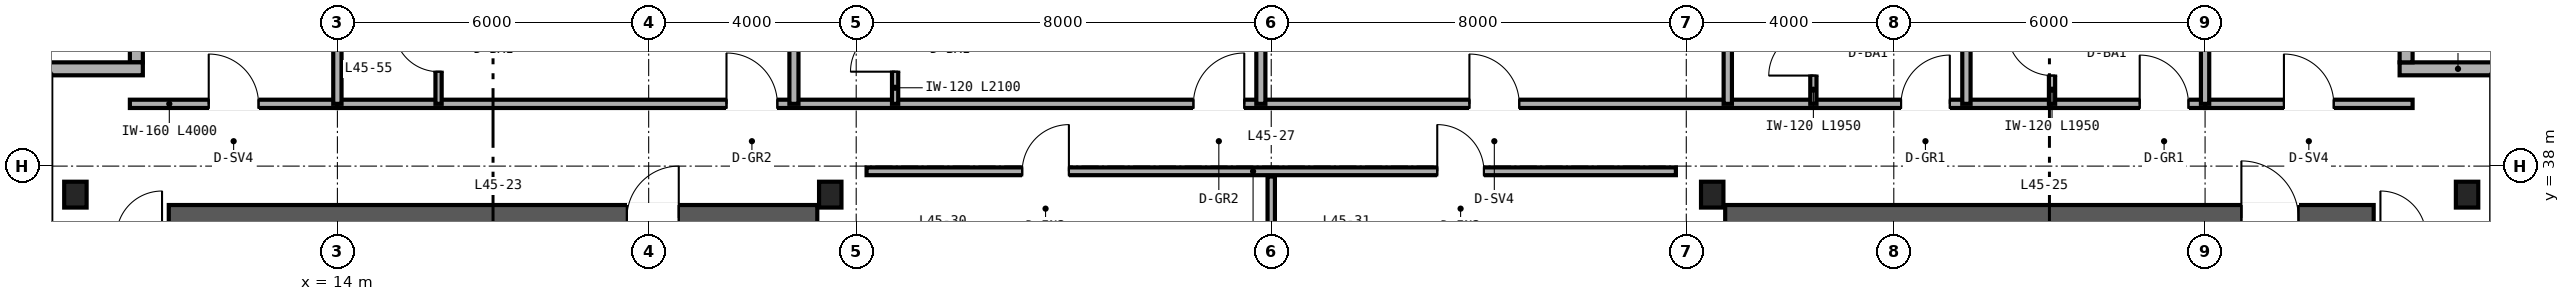
"""IFC4 building model, lengths in metres.
Left out: names, types, materials, properties, quantities, classifications, styles, units other than length and angle.
Written with IfcOpenShell. Run it as: python <this file> out.ifc"""

import sys

from ifc_helpers import new_model, si_unit, direction, frame, frame_2d, origin, origin_2d, place, context, subcontext, project, spatial, rectangle, i_section, extrude, source, transform, mapped, element, fill, save


model = new_model("IFC4")
c1 = context("Model", 3, precision=1e-05, world=origin(), true_north=direction((0.0, 1.0)))
c2 = subcontext(c1, "Body", "Model", "MODEL_VIEW")
j1 = project(units=[si_unit("LENGTHUNIT", "METRE"), si_unit("PLANEANGLEUNIT", "RADIAN")], contexts=[c1])
p1 = place(None, origin())
s1 = spatial("IfcSite", under=j1, at=p1, CompositionType="ELEMENT")
p2 = place(p1, origin())
s2 = spatial("IfcBuilding", under=s1, at=p2, CompositionType="ELEMENT")
p3 = place(p2, frame((0.0, 0.0, 181.2)))
s3 = spatial("IfcBuildingStorey", under=s2, at=p3, CompositionType="ELEMENT", Elevation=181.2)
p4 = place(p3, frame((10.75, 37.0, 0.0), z_axis=(0.0, 0.0, 1.0), x_axis=(1.0, 0.0, 0.0)))
e1 = element("IfcWall", 1, at=p4, inside=s3, PredefinedType="SHEAR", context=c2, shape_type="SweptSolid", body=[
    extrude(rectangle(XDim=12.5, YDim=0.5, at=frame_2d((6.25, 0.0))), origin(), (0.0, 0.0, 1.0), 3.37),
])
p5 = place(p4, frame((8.83, 0.0, 0.0)))
e2 = element("IfcOpeningElement", 2, at=p5, cuts=e1, PredefinedType="OPENING", context=c2, shape_type="SweptSolid", body=[
    extrude(rectangle(XDim=1.0, YDim=2.15, at=frame_2d((0.5, 1.075))), frame((0.0, 0.26, 0.0), z_axis=(0.0, -1.0, 0.0), x_axis=(1.0, 0.0, 0.0)), (0.0, 0.0, 1.0), 0.52),
])
p6 = place(p3, frame((40.75, 37.0, 0.0), z_axis=(0.0, 0.0, 1.0), x_axis=(1.0, 0.0, 0.0)))
e3 = element("IfcWall", 3, at=p6, inside=s3, PredefinedType="SHEAR", context=c2, shape_type="SweptSolid", body=[
    extrude(rectangle(XDim=12.5, YDim=0.5, at=frame_2d((6.25, 0.0))), origin(), (0.0, 0.0, 1.0), 3.37),
])
p7 = place(p6, frame((9.95, 0.0, 0.0)))
e4 = element("IfcOpeningElement", 4, at=p7, cuts=e3, PredefinedType="OPENING", context=c2, shape_type="SweptSolid", body=[
    extrude(rectangle(XDim=1.1, YDim=2.15, at=frame_2d((0.55, 1.075))), frame((0.0, 0.26, 0.0), z_axis=(0.0, -1.0, 0.0), x_axis=(1.0, 0.0, 0.0)), (0.0, 0.0, 1.0), 0.52),
])
m1 = source(origin(), c2, "Body", "SweptSolid", [
    extrude(i_section(OverallWidth=0.432, OverallDepth=0.498, WebThickness=0.056, FlangeThickness=0.089, FilletRadius=0.025, at=origin_2d()), origin(), (0.0, 0.0, 1.0), 3.37),
])
for number, where, z_axis, x_axis in (
    (5, (8.95, 37.45, 0.0), (0.0, 0.0, 1.0), (1.0, 0.0, 0.0)),
    (6, (23.5, 37.45, 0.0), (0.0, 0.0, 1.0), (1.0, 0.0, 0.0)),
    (7, (40.5, 37.45, 0.0), (0.0, 0.0, 1.0), (1.0, 0.0, 0.0)),
    (8, (55.05, 37.45, 0.0), (0.0, 0.0, 1.0), (1.0, 0.0, 0.0)),
):
    element("IfcColumn", number, at=place(p3, frame(where, z_axis=z_axis, x_axis=x_axis)), inside=s3, PredefinedType="COLUMN", context=c2, shape_type="MappedRepresentation", body=[
        mapped(m1, transform((0.0, 0.0, 0.0), scale=1.0)),
    ])
p8 = place(p3, frame((56.0, 39.875, 0.0), z_axis=(0.0, 0.0, 1.0), x_axis=(-1.0, 0.0, 0.0)))
e9 = element("IfcWall", 9, at=p8, inside=s3, PredefinedType="SOLIDWALL", context=c2, shape_type="SweptSolid", body=[
    extrude(rectangle(XDim=2.25, YDim=0.25, at=frame_2d((1.125, 0.0))), origin(), (0.0, 0.0, 1.0), 3.37),
])
for number, where, z_axis, x_axis in (
    (10, (53.875, 40.0, 0.0), (0.0, 0.0, 1.0), (0.0, 1.0, 0.0)),
    (11, (10.125, 42.0, 0.0), (0.0, 0.0, 1.0), (0.0, -1.0, 0.0)),
):
    element("IfcWall", number, at=place(p3, frame(where, z_axis=z_axis, x_axis=x_axis)), inside=s3, PredefinedType="SOLIDWALL", context=c2, shape_type="SweptSolid", body=[
        extrude(rectangle(XDim=2.0, YDim=0.25, at=frame_2d((1.0, 0.0))), origin(), (0.0, 0.0, 1.0), 3.37),
    ])
p9 = place(p3, frame((10.25, 39.875, 0.0), z_axis=(0.0, 0.0, 1.0), x_axis=(-1.0, 0.0, 0.0)))
e12 = element("IfcWall", 12, at=p9, inside=s3, PredefinedType="SOLIDWALL", context=c2, shape_type="SweptSolid", body=[
    extrude(rectangle(XDim=2.25, YDim=0.25, at=frame_2d((1.125, 0.0))), origin(), (0.0, 0.0, 1.0), 3.37),
])
p10 = place(p3, frame((24.2, 37.9, 0.0), z_axis=(0.0, 0.0, 1.0), x_axis=(1.0, 0.0, 0.0)))
e13 = element("IfcWall", 13, at=p10, inside=s3, PredefinedType="PARTITIONING", context=c2, shape_type="SweptSolid", body=[
    extrude(rectangle(XDim=15.6, YDim=0.15, at=frame_2d((7.8, 0.0))), origin(), (0.0, 0.0, 1.0), 3.37),
])
p11 = place(p10, frame((3.0, 0.0, 0.0)))
e14 = element("IfcOpeningElement", 14, at=p11, cuts=e13, PredefinedType="OPENING", context=c2, shape_type="SweptSolid", body=[
    extrude(rectangle(XDim=0.9, YDim=2.15, at=frame_2d((0.45, 1.075))), frame((0.0, 0.085, 0.0), z_axis=(0.0, -1.0, 0.0), x_axis=(1.0, 0.0, 0.0)), (0.0, 0.0, 1.0), 0.17),
])
p12 = place(p10, frame((11.0, 0.0, 0.0)))
e15 = element("IfcOpeningElement", 15, at=p12, cuts=e13, PredefinedType="OPENING", context=c2, shape_type="SweptSolid", body=[
    extrude(rectangle(XDim=0.9, YDim=2.15, at=frame_2d((0.45, 1.075))), frame((0.0, 0.085, 0.0), z_axis=(0.0, -1.0, 0.0), x_axis=(1.0, 0.0, 0.0)), (0.0, 0.0, 1.0), 0.17),
])
p13 = place(p3, frame((32.0, 36.12, 0.0), z_axis=(0.0, 0.0, 1.0), x_axis=(0.0, 1.0, 0.0)))
e16 = element("IfcWall", 16, at=p13, inside=s3, PredefinedType="PARTITIONING", context=c2, shape_type="SweptSolid", body=[
    extrude(rectangle(XDim=1.68, YDim=0.142, at=frame_2d((0.84, 0.0))), origin(), (0.0, 0.0, 1.0), 3.37),
])
p14 = place(p3, frame((10.0, 39.2, 0.0), z_axis=(0.0, 0.0, 1.0), x_axis=(1.0, 0.0, 0.0)))
e17 = element("IfcWall", 17, at=p14, inside=s3, PredefinedType="PARTITIONING", context=c2, shape_type="SweptSolid", body=[
    extrude(rectangle(XDim=4.0, YDim=0.16, at=frame_2d((2.0, 0.0))), origin(), (0.0, 0.0, 1.0), 3.37),
])
p15 = place(p14, frame((1.52, 0.0, 0.0)))
e18 = element("IfcOpeningElement", 18, at=p15, cuts=e17, PredefinedType="OPENING", context=c2, shape_type="SweptSolid", body=[
    extrude(rectangle(XDim=0.96, YDim=2.15, at=frame_2d((0.48, 1.075))), frame((0.0, 0.09, 0.0), z_axis=(0.0, -1.0, 0.0), x_axis=(1.0, 0.0, 0.0)), (0.0, 0.0, 1.0), 0.18),
])
p16 = place(p3, frame((50.0, 39.2, 0.0), z_axis=(0.0, 0.0, 1.0), x_axis=(1.0, 0.0, 0.0)))
e19 = element("IfcWall", 19, at=p16, inside=s3, PredefinedType="PARTITIONING", context=c2, shape_type="SweptSolid", body=[
    extrude(rectangle(XDim=4.0, YDim=0.16, at=frame_2d((2.0, 0.0))), origin(), (0.0, 0.0, 1.0), 3.37),
])
p17 = place(p16, frame((1.52, 0.0, 0.0)))
e20 = element("IfcOpeningElement", 20, at=p17, cuts=e19, PredefinedType="OPENING", context=c2, shape_type="SweptSolid", body=[
    extrude(rectangle(XDim=0.96, YDim=2.15, at=frame_2d((0.48, 1.075))), frame((0.0, 0.09, 0.0), z_axis=(0.0, -1.0, 0.0), x_axis=(1.0, 0.0, 0.0)), (0.0, 0.0, 1.0), 0.18),
])
p18 = place(p3, frame((14.0, 39.2, 0.0), z_axis=(0.0, 0.0, 1.0), x_axis=(1.0, 0.0, 0.0)))
e21 = element("IfcWall", 21, at=p18, inside=s3, PredefinedType="PARTITIONING", context=c2, shape_type="SweptSolid", body=[
    extrude(rectangle(XDim=36.0, YDim=0.16, at=frame_2d((18.0, 0.0))), origin(), (0.0, 0.0, 1.0), 2.913),
])
p19 = place(p18, frame((7.5, 0.0, 0.0)))
e22 = element("IfcOpeningElement", 22, at=p19, cuts=e21, PredefinedType="OPENING", context=c2, shape_type="SweptSolid", body=[
    extrude(rectangle(XDim=0.98, YDim=2.2, at=frame_2d((0.49, 1.1))), frame((0.0, 0.09, 0.0), z_axis=(0.0, -1.0, 0.0), x_axis=(1.0, 0.0, 0.0)), (0.0, 0.0, 1.0), 0.18),
])
p20 = place(p18, frame((16.5, 0.0, 0.0)))
e23 = element("IfcOpeningElement", 23, at=p20, cuts=e21, PredefinedType="OPENING", context=c2, shape_type="SweptSolid", body=[
    extrude(rectangle(XDim=0.98, YDim=2.2, at=frame_2d((0.49, 1.1))), frame((0.0, 0.09, 0.0), z_axis=(0.0, -1.0, 0.0), x_axis=(1.0, 0.0, 0.0)), (0.0, 0.0, 1.0), 0.18),
])
p21 = place(p18, frame((21.82, 0.0, 0.0)))
e24 = element("IfcOpeningElement", 24, at=p21, cuts=e21, PredefinedType="OPENING", context=c2, shape_type="SweptSolid", body=[
    extrude(rectangle(XDim=0.96, YDim=2.15, at=frame_2d((0.48, 1.075))), frame((0.0, 0.09, 0.0), z_axis=(0.0, -1.0, 0.0), x_axis=(1.0, 0.0, 0.0)), (0.0, 0.0, 1.0), 0.18),
])
p22 = place(p18, frame((30.14, 0.0, 0.0)))
e25 = element("IfcOpeningElement", 25, at=p22, cuts=e21, PredefinedType="OPENING", context=c2, shape_type="SweptSolid", body=[
    extrude(rectangle(XDim=0.94, YDim=2.15, at=frame_2d((0.47, 1.075))), frame((0.0, 0.09, 0.0), z_axis=(0.0, -1.0, 0.0), x_axis=(1.0, 0.0, 0.0)), (0.0, 0.0, 1.0), 0.18),
])
p23 = place(p18, frame((34.74, 0.0, 0.0)))
e26 = element("IfcOpeningElement", 26, at=p23, cuts=e21, PredefinedType="OPENING", context=c2, shape_type="SweptSolid", body=[
    extrude(rectangle(XDim=0.94, YDim=2.15, at=frame_2d((0.47, 1.075))), frame((0.0, 0.09, 0.0), z_axis=(0.0, -1.0, 0.0), x_axis=(1.0, 0.0, 0.0)), (0.0, 0.0, 1.0), 0.18),
])
for number, where, z_axis, x_axis in (
    (27, (14.0, 39.2, 0.0), (0.0, 0.0, 1.0), (0.0, 1.0, 0.0)),
    (28, (50.0, 39.2, 0.0), (0.0, 0.0, 1.0), (0.0, 1.0, 0.0)),
):
    element("IfcWall", number, at=place(p3, frame(where, z_axis=z_axis, x_axis=x_axis)), inside=s3, PredefinedType="PARTITIONING", context=c2, shape_type="SweptSolid", body=[
        extrude(rectangle(XDim=6.44, YDim=0.16, at=frame_2d((3.22, 0.0))), origin(), (0.0, 0.0, 1.0), 2.677),
    ])
p24 = place(p3, frame((22.8, 39.2, 0.0), z_axis=(0.0, 0.0, 1.0), x_axis=(0.0, 1.0, 0.0)))
e29 = element("IfcWall", 29, at=p24, inside=s3, PredefinedType="PARTITIONING", context=c2, shape_type="SweptSolid", body=[
    extrude(rectangle(XDim=6.44, YDim=0.175, at=frame_2d((3.22, 0.0))), origin(), (0.0, 0.0, 1.0), 2.833),
])
p25 = place(p3, frame((15.95, 39.2, 0.0), z_axis=(0.0, 0.0, 1.0), x_axis=(0.0, 1.0, 0.0)))
e30 = element("IfcWall", 30, at=p25, inside=s3, PredefinedType="PARTITIONING", context=c2, shape_type="SweptSolid", body=[
    extrude(rectangle(XDim=2.1, YDim=0.12, at=frame_2d((1.05, 0.0))), origin(), (0.0, 0.0, 1.0), 3.37),
])
p26 = place(p25, frame((0.62, 0.0, 0.0)))
e31 = element("IfcOpeningElement", 31, at=p26, cuts=e30, PredefinedType="OPENING", context=c2, shape_type="SweptSolid", body=[
    extrude(rectangle(XDim=0.86, YDim=2.1, at=frame_2d((0.43, 1.05))), frame((0.0, 0.07, 0.0), z_axis=(0.0, -1.0, 0.0), x_axis=(1.0, 0.0, 0.0)), (0.0, 0.0, 1.0), 0.14),
])
p27 = place(p3, frame((31.8, 39.2, 0.0), z_axis=(0.0, 0.0, 1.0), x_axis=(0.0, 1.0, 0.0)))
e32 = element("IfcWall", 32, at=p27, inside=s3, PredefinedType="PARTITIONING", context=c2, shape_type="SweptSolid", body=[
    extrude(rectangle(XDim=6.44, YDim=0.175, at=frame_2d((3.22, 0.0))), origin(), (0.0, 0.0, 1.0), 2.443),
])
p28 = place(p3, frame((24.75, 39.2, 0.0), z_axis=(0.0, 0.0, 1.0), x_axis=(0.0, 1.0, 0.0)))
e33 = element("IfcWall", 33, at=p28, inside=s3, PredefinedType="PARTITIONING", context=c2, shape_type="SweptSolid", body=[
    extrude(rectangle(XDim=2.1, YDim=0.12, at=frame_2d((1.05, 0.0))), origin(), (0.0, 0.0, 1.0), 3.37),
])
p29 = place(p28, frame((0.62, 0.0, 0.0)))
e34 = element("IfcOpeningElement", 34, at=p29, cuts=e33, PredefinedType="OPENING", context=c2, shape_type="SweptSolid", body=[
    extrude(rectangle(XDim=0.86, YDim=2.1, at=frame_2d((0.43, 1.05))), frame((0.0, 0.07, 0.0), z_axis=(0.0, -1.0, 0.0), x_axis=(1.0, 0.0, 0.0)), (0.0, 0.0, 1.0), 0.14),
])
p30 = place(p3, frame((40.8, 39.2, 0.0), z_axis=(0.0, 0.0, 1.0), x_axis=(0.0, 1.0, 0.0)))
e35 = element("IfcWall", 35, at=p30, inside=s3, PredefinedType="PARTITIONING", context=c2, shape_type="SweptSolid", body=[
    extrude(rectangle(XDim=6.44, YDim=0.16, at=frame_2d((3.22, 0.0))), origin(), (0.0, 0.0, 1.0), 2.443),
])
p31 = place(p3, frame((45.4, 39.2, 0.0), z_axis=(0.0, 0.0, 1.0), x_axis=(0.0, 1.0, 0.0)))
e36 = element("IfcWall", 36, at=p31, inside=s3, PredefinedType="PARTITIONING", context=c2, shape_type="SweptSolid", body=[
    extrude(rectangle(XDim=6.44, YDim=0.16, at=frame_2d((3.22, 0.0))), origin(), (0.0, 0.0, 1.0), 2.677),
])
p32 = place(p3, frame((42.45, 39.2, 0.0), z_axis=(0.0, 0.0, 1.0), x_axis=(0.0, 1.0, 0.0)))
e37 = element("IfcWall", 37, at=p32, inside=s3, PredefinedType="PARTITIONING", context=c2, shape_type="SweptSolid", body=[
    extrude(rectangle(XDim=1.95, YDim=0.12, at=frame_2d((0.975, 0.0))), origin(), (0.0, 0.0, 1.0), 3.37),
])
p33 = place(p32, frame((0.545, 0.0, 0.0)))
e38 = element("IfcOpeningElement", 38, at=p33, cuts=e37, PredefinedType="OPENING", context=c2, shape_type="SweptSolid", body=[
    extrude(rectangle(XDim=0.86, YDim=2.1, at=frame_2d((0.43, 1.05))), frame((0.0, 0.07, 0.0), z_axis=(0.0, -1.0, 0.0), x_axis=(1.0, 0.0, 0.0)), (0.0, 0.0, 1.0), 0.14),
])
p34 = place(p3, frame((47.05, 39.2, 0.0), z_axis=(0.0, 0.0, 1.0), x_axis=(0.0, 1.0, 0.0)))
e39 = element("IfcWall", 39, at=p34, inside=s3, PredefinedType="PARTITIONING", context=c2, shape_type="SweptSolid", body=[
    extrude(rectangle(XDim=1.95, YDim=0.12, at=frame_2d((0.975, 0.0))), origin(), (0.0, 0.0, 1.0), 3.37),
])
p35 = place(p34, frame((0.545, 0.0, 0.0)))
e40 = element("IfcOpeningElement", 40, at=p35, cuts=e39, PredefinedType="OPENING", context=c2, shape_type="SweptSolid", body=[
    extrude(rectangle(XDim=0.86, YDim=2.1, at=frame_2d((0.43, 1.05))), frame((0.0, 0.07, 0.0), z_axis=(0.0, -1.0, 0.0), x_axis=(1.0, 0.0, 0.0)), (0.0, 0.0, 1.0), 0.14),
])
m2 = source(origin(), c2, "Body", "SweptSolid", [
    extrude(rectangle(XDim=1.0, YDim=2.15, at=frame_2d((0.5, 1.075))), frame((0.0, 0.025, 0.0), z_axis=(0.0, -1.0, 0.0), x_axis=(1.0, 0.0, 0.0)), (0.0, 0.0, 1.0), 0.05),
])
p36 = place(p5, origin())
e41 = element("IfcDoor", 41, at=p36, inside=s3, OperationType="SINGLE_SWING_RIGHT", PredefinedType="DOOR", context=c2, shape_type="MappedRepresentation", body=[
    mapped(m2, transform((0.0, 0.0, 0.0), scale=1.0)),
])
fill(e2, e41)
m3 = source(origin(), c2, "Body", "SweptSolid", [
    extrude(rectangle(XDim=1.1, YDim=2.15, at=frame_2d((0.55, 1.075))), frame((0.0, 0.025, 0.0), z_axis=(0.0, -1.0, 0.0), x_axis=(1.0, 0.0, 0.0)), (0.0, 0.0, 1.0), 0.05),
])
p37 = place(p7, origin())
e42 = element("IfcDoor", 42, at=p37, inside=s3, OperationType="SINGLE_SWING_LEFT", PredefinedType="DOOR", context=c2, shape_type="MappedRepresentation", body=[
    mapped(m3, transform((0.0, 0.0, 0.0), scale=1.0)),
])
fill(e4, e42)
m4 = source(origin(), c2, "Body", "SweptSolid", [
    extrude(rectangle(XDim=0.9, YDim=2.15, at=frame_2d((0.45, 1.075))), frame((0.0, 0.025, 0.0), z_axis=(0.0, -1.0, 0.0), x_axis=(1.0, 0.0, 0.0)), (0.0, 0.0, 1.0), 0.05),
])
p38 = place(p11, origin())
e43 = element("IfcDoor", 43, at=p38, inside=s3, OperationType="SINGLE_SWING_RIGHT", PredefinedType="DOOR", context=c2, shape_type="MappedRepresentation", body=[
    mapped(m4, transform((0.0, 0.0, 0.0), scale=1.0)),
])
fill(e14, e43)
p39 = place(p12, origin())
e44 = element("IfcDoor", 44, at=p39, inside=s3, OperationType="SINGLE_SWING_LEFT", PredefinedType="DOOR", context=c2, shape_type="MappedRepresentation", body=[
    mapped(m4, transform((0.0, 0.0, 0.0), scale=1.0)),
])
fill(e15, e44)
m5 = source(origin(), c2, "Body", "SweptSolid", [
    extrude(rectangle(XDim=0.96, YDim=2.15, at=frame_2d((0.48, 1.075))), frame((0.0, 0.025, 0.0), z_axis=(0.0, -1.0, 0.0), x_axis=(1.0, 0.0, 0.0)), (0.0, 0.0, 1.0), 0.05),
])
p40 = place(p15, origin())
e45 = element("IfcDoor", 45, at=p40, inside=s3, OperationType="SINGLE_SWING_LEFT", PredefinedType="DOOR", context=c2, shape_type="MappedRepresentation", body=[
    mapped(m5, transform((0.0, 0.0, 0.0), scale=1.0)),
])
fill(e18, e45)
p41 = place(p17, origin())
e46 = element("IfcDoor", 46, at=p41, inside=s3, OperationType="SINGLE_SWING_LEFT", PredefinedType="DOOR", context=c2, shape_type="MappedRepresentation", body=[
    mapped(m5, transform((0.0, 0.0, 0.0), scale=1.0)),
])
fill(e20, e46)
m6 = source(origin(), c2, "Body", "SweptSolid", [
    extrude(rectangle(XDim=0.86, YDim=2.1, at=frame_2d((0.43, 1.05))), frame((0.0, 0.025, 0.0), z_axis=(0.0, -1.0, 0.0), x_axis=(1.0, 0.0, 0.0)), (0.0, 0.0, 1.0), 0.05),
])
p42 = place(p26, origin())
e47 = element("IfcDoor", 47, at=p42, inside=s3, OperationType="SINGLE_SWING_RIGHT", PredefinedType="DOOR", context=c2, shape_type="MappedRepresentation", body=[
    mapped(m6, transform((0.0, 0.0, 0.0), scale=1.0)),
])
fill(e31, e47)
p43 = place(p29, origin())
e48 = element("IfcDoor", 48, at=p43, inside=s3, OperationType="SINGLE_SWING_LEFT", PredefinedType="DOOR", context=c2, shape_type="MappedRepresentation", body=[
    mapped(m6, transform((0.0, 0.0, 0.0), scale=1.0)),
])
fill(e34, e48)
p44 = place(p33, origin())
e49 = element("IfcDoor", 49, at=p44, inside=s3, OperationType="SINGLE_SWING_LEFT", PredefinedType="DOOR", context=c2, shape_type="MappedRepresentation", body=[
    mapped(m6, transform((0.0, 0.0, 0.0), scale=1.0)),
])
fill(e38, e49)
p45 = place(p35, origin())
e50 = element("IfcDoor", 50, at=p45, inside=s3, OperationType="SINGLE_SWING_RIGHT", PredefinedType="DOOR", context=c2, shape_type="MappedRepresentation", body=[
    mapped(m6, transform((0.0, 0.0, 0.0), scale=1.0)),
])
fill(e40, e50)
m7 = source(origin(), c2, "Body", "SweptSolid", [
    extrude(rectangle(XDim=0.98, YDim=2.2, at=frame_2d((0.49, 1.1))), frame((0.0, 0.025, 0.0), z_axis=(0.0, -1.0, 0.0), x_axis=(1.0, 0.0, 0.0)), (0.0, 0.0, 1.0), 0.05),
])
p46 = place(p19, origin())
e51 = element("IfcDoor", 51, at=p46, inside=s3, OperationType="SINGLE_SWING_LEFT", PredefinedType="DOOR", context=c2, shape_type="MappedRepresentation", body=[
    mapped(m7, transform((0.0, 0.0, 0.0), scale=1.0)),
])
fill(e22, e51)
p47 = place(p20, origin())
e52 = element("IfcDoor", 52, at=p47, inside=s3, OperationType="SINGLE_SWING_RIGHT", PredefinedType="DOOR", context=c2, shape_type="MappedRepresentation", body=[
    mapped(m7, transform((0.0, 0.0, 0.0), scale=1.0)),
])
fill(e23, e52)
p48 = place(p21, origin())
e53 = element("IfcDoor", 53, at=p48, inside=s3, OperationType="SINGLE_SWING_LEFT", PredefinedType="DOOR", context=c2, shape_type="MappedRepresentation", body=[
    mapped(m5, transform((0.0, 0.0, 0.0), scale=1.0)),
])
fill(e24, e53)
m8 = source(origin(), c2, "Body", "SweptSolid", [
    extrude(rectangle(XDim=0.94, YDim=2.15, at=frame_2d((0.47, 1.075))), frame((0.0, 0.025, 0.0), z_axis=(0.0, -1.0, 0.0), x_axis=(1.0, 0.0, 0.0)), (0.0, 0.0, 1.0), 0.05),
])
p49 = place(p22, origin())
e54 = element("IfcDoor", 54, at=p49, inside=s3, OperationType="SINGLE_SWING_RIGHT", PredefinedType="DOOR", context=c2, shape_type="MappedRepresentation", body=[
    mapped(m8, transform((0.0, 0.0, 0.0), scale=1.0)),
])
fill(e25, e54)
p50 = place(p23, origin())
e55 = element("IfcDoor", 55, at=p50, inside=s3, OperationType="SINGLE_SWING_LEFT", PredefinedType="DOOR", context=c2, shape_type="MappedRepresentation", body=[
    mapped(m8, transform((0.0, 0.0, 0.0), scale=1.0)),
])
fill(e26, e55)
save(model, sys.argv[1])
